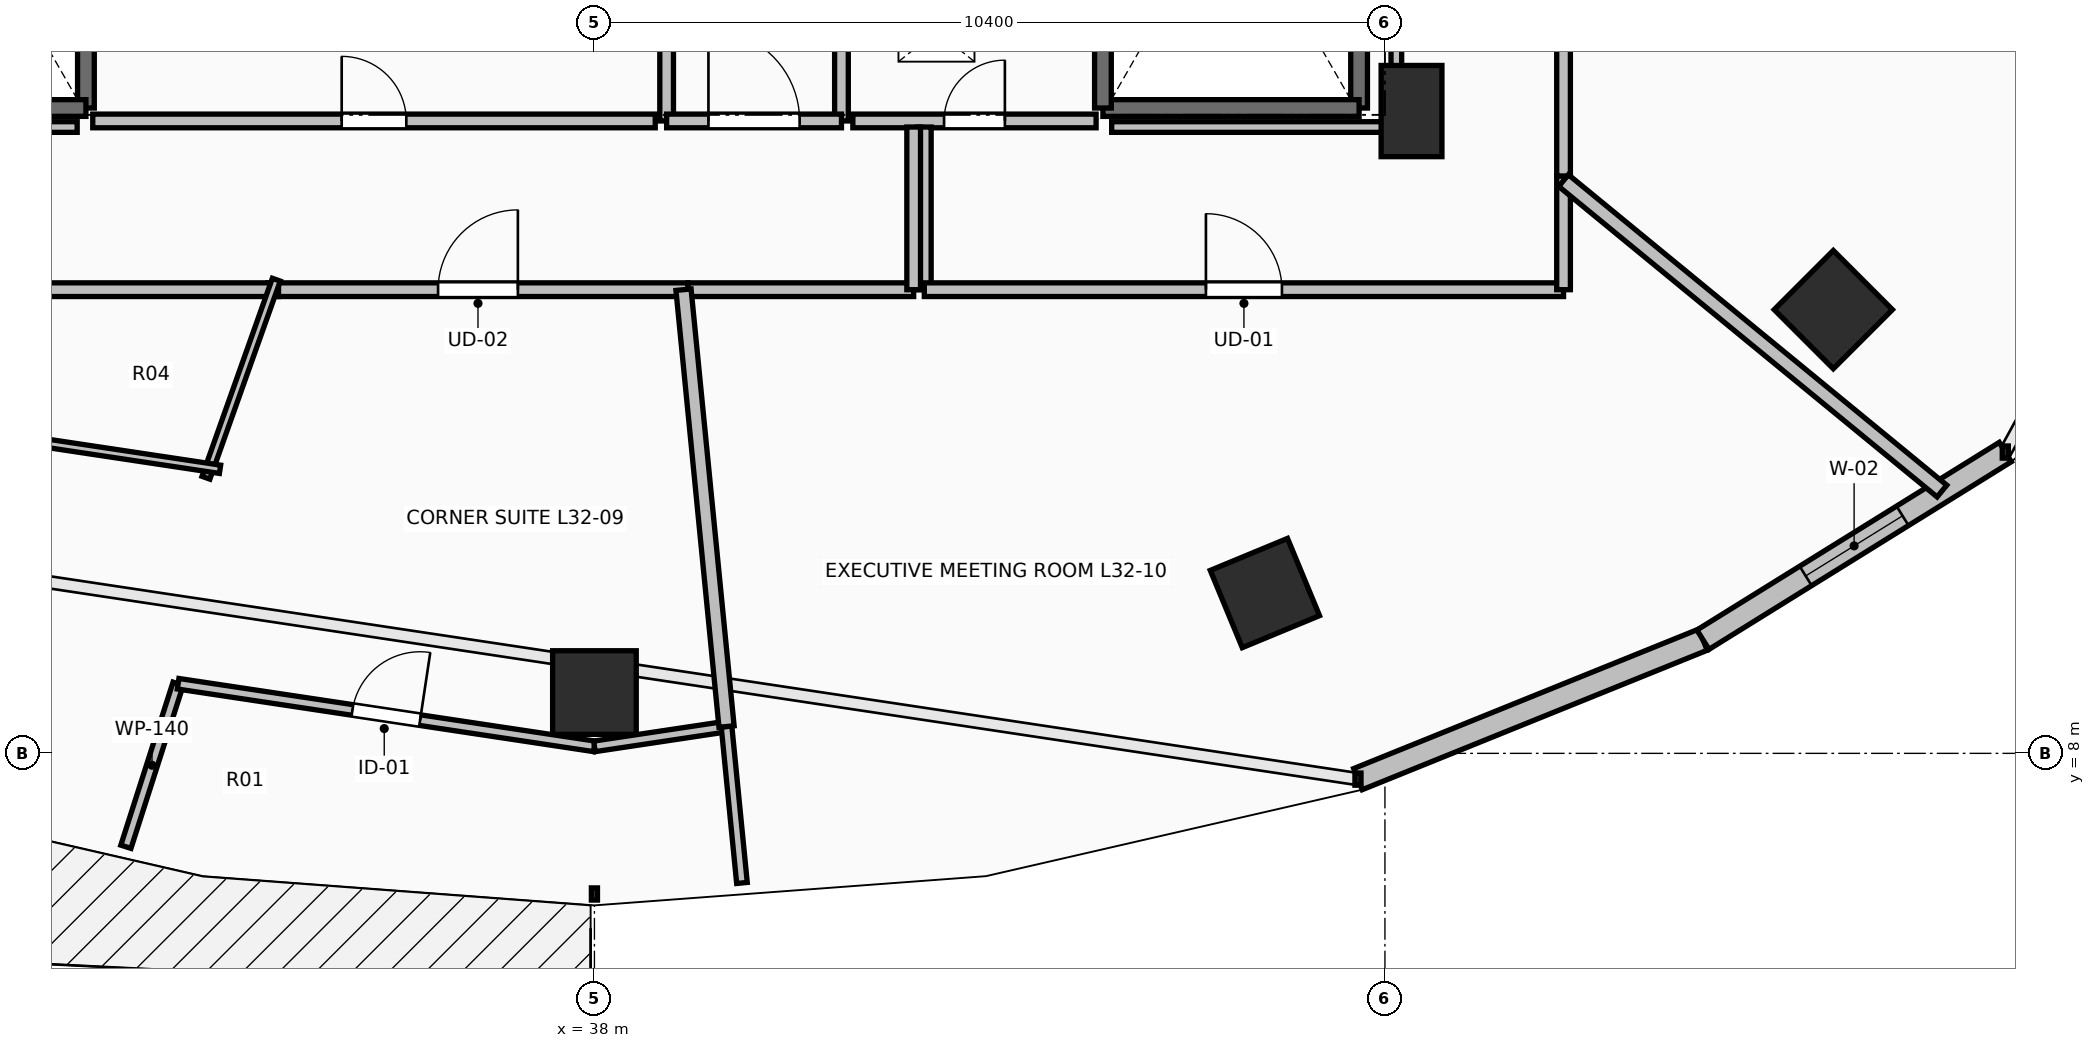
"""IFC4 building model, lengths in metres.
Left out: names, types, materials, properties, quantities, classifications, styles, units other than length and angle.
Written with IfcOpenShell. Run it as: python <this file> out.ifc"""

import sys

from ifc_helpers import new_model, si_unit, direction, frame, frame_2d, origin, origin_2d, place, context, subcontext, project, spatial, rectangle, extrude, element, fill, save


model = new_model("IFC4")
c1 = context("Model", 3, precision=1e-05, world=origin(), true_north=direction((0.0, 1.0)))
c2 = subcontext(c1, "Body", "Model", "MODEL_VIEW")
j1 = project(units=[si_unit("LENGTHUNIT", "METRE"), si_unit("PLANEANGLEUNIT", "RADIAN")], contexts=[c1])
p1 = place(None, origin())
s1 = spatial("IfcSite", under=j1, at=p1, CompositionType="ELEMENT")
p2 = place(p1, origin())
s2 = spatial("IfcBuilding", under=s1, at=p2, CompositionType="ELEMENT")
p3 = place(p2, frame((0.0, 0.0, 120.8)))
s3 = spatial("IfcBuildingStorey", under=s2, at=p3, CompositionType="ELEMENT", Elevation=120.8)
for number, where, z_axis, x_axis in (
    (1, (38.0, 8.8, 0.0), (0.0, 0.0, 1.0), (0.0, -1.0, 0.0)),
    (2, (46.821, 10.109, 0.0), (0.0, 0.0, 1.0), (0.383, -0.924, 0.0)),
    (3, (54.299, 13.838, 0.0), (0.0, 0.0, 1.0), (0.707, -0.707, 0.0)),
):
    element("IfcColumn", number, at=place(p3, frame(where, z_axis=z_axis, x_axis=x_axis)), inside=s3, PredefinedType="COLUMN", context=c2, shape_type="SweptSolid", body=[
        extrude(rectangle(XDim=1.1, YDim=1.1, at=origin_2d()), origin(), (0.0, 0.0, 1.0), 3.5),
    ])
p4 = place(p3, frame((48.75, 16.45, 0.0), z_axis=(0.0, 0.0, 1.0), x_axis=(1.0, 0.0, 0.0)))
e4 = element("IfcColumn", 4, at=p4, inside=s3, PredefinedType="PILASTER", context=c2, shape_type="SweptSolid", body=[
    extrude(rectangle(XDim=0.8, YDim=1.2, at=origin_2d()), origin(), (0.0, 0.0, 1.0), 3.5),
])
p5 = place(p3, frame((48.045, 7.661, 0.0), z_axis=(0.0, 0.0, 1.0), x_axis=(0.927122233109, 0.374759075775, 0.0)))
e5 = element("IfcWall", 5, at=p5, inside=s3, PredefinedType="STANDARD", context=c2, shape_type="SweptSolid", body=[
    extrude(rectangle(XDim=4.895, YDim=0.3, at=frame_2d((2.448, 0.0))), origin(), (0.0, 0.0, 1.0), 3.15),
])
p6 = place(p3, frame((52.584, 9.495, 0.0), z_axis=(0.0, 0.0, 1.0), x_axis=(0.849684479743, 0.527291461038, 0.0)))
e6 = element("IfcWall", 6, at=p6, inside=s3, PredefinedType="STANDARD", context=c2, shape_type="SweptSolid", body=[
    extrude(rectangle(XDim=4.681, YDim=0.3, at=frame_2d((2.341, 0.0))), origin(), (0.0, 0.0, 1.0), 3.15),
])
p7 = place(p6, frame((1.591, 0.0, 0.85)))
e7 = element("IfcOpeningElement", 7, at=p7, cuts=e6, PredefinedType="OPENING", context=c2, shape_type="SweptSolid", body=[
    extrude(rectangle(XDim=1.5, YDim=2.1, at=frame_2d((0.75, 1.05))), frame((0.0, 0.165, 0.0), z_axis=(0.0, -1.0, 0.0), x_axis=(1.0, 0.0, 0.0)), (0.0, 0.0, 1.0), 0.33),
])
p8 = place(p3, frame((31.31, 23.91, 0.0), z_axis=(0.0, 0.0, 1.0), x_axis=(0.0, -1.0, 0.0)))
e8 = element("IfcWall", 8, at=p8, inside=s3, PredefinedType="SOLIDWALL", context=c2, shape_type="SweptSolid", body=[
    extrude(rectangle(XDim=7.42, YDim=0.22, at=frame_2d((3.71, 0.0))), origin(), (0.0, 0.0, 1.0), 3.15),
])
p9 = place(p3, frame((31.31, 16.49, 0.0), z_axis=(0.0, 0.0, 1.0), x_axis=(-1.0, 0.0, 0.0)))
e9 = element("IfcWall", 9, at=p9, inside=s3, PredefinedType="SOLIDWALL", context=c2, shape_type="SweptSolid", body=[
    extrude(rectangle(XDim=3.37, YDim=0.22, at=frame_2d((1.685, 0.0))), origin(), (0.0, 0.0, 1.0), 3.15),
])
p10 = place(p3, frame((48.06, 23.91, 0.0), z_axis=(0.0, 0.0, 1.0), x_axis=(0.0, -1.0, 0.0)))
e10 = element("IfcWall", 10, at=p10, inside=s3, PredefinedType="SOLIDWALL", context=c2, shape_type="SweptSolid", body=[
    extrude(rectangle(XDim=7.42, YDim=0.22, at=frame_2d((3.71, 0.0))), origin(), (0.0, 0.0, 1.0), 3.15),
])
p11 = place(p3, frame((48.06, 16.49, 0.0), z_axis=(0.0, 0.0, 1.0), x_axis=(-1.0, 0.0, 0.0)))
e11 = element("IfcWall", 11, at=p11, inside=s3, PredefinedType="SOLIDWALL", context=c2, shape_type="SweptSolid", body=[
    extrude(rectangle(XDim=3.37, YDim=0.22, at=frame_2d((1.685, 0.0))), origin(), (0.0, 0.0, 1.0), 3.15),
])
p12 = place(p3, frame((44.69, 16.49, 0.0), z_axis=(0.0, 0.0, 1.0), x_axis=(0.0, 1.0, 0.0)))
e12 = element("IfcWall", 12, at=p12, inside=s3, PredefinedType="SOLIDWALL", context=c2, shape_type="SweptSolid", body=[
    extrude(rectangle(XDim=7.42, YDim=0.22, at=frame_2d((3.71, 0.0))), origin(), (0.0, 0.0, 1.0), 3.15),
])
p13 = place(p3, frame((41.25, 16.32, 0.0), z_axis=(0.0, 0.0, 1.0), x_axis=(0.0, 1.0, 0.0)))
e13 = element("IfcWall", 13, at=p13, inside=s3, PredefinedType="PARTITIONING", context=c2, shape_type="SweptSolid", body=[
    extrude(rectangle(XDim=3.985, YDim=0.18, at=frame_2d((1.992, 0.0))), origin(), (0.0, 0.0, 1.0), 3.15),
])
p14 = place(p13, frame((1.593, 0.0, 0.0)))
e14 = element("IfcOpeningElement", 14, at=p14, cuts=e13, PredefinedType="OPENING", context=c2, shape_type="SweptSolid", body=[
    extrude(rectangle(XDim=0.8, YDim=2.05, at=frame_2d((0.4, 1.025))), frame((0.0, 0.105, 0.0), z_axis=(0.0, -1.0, 0.0), x_axis=(1.0, 0.0, 0.0)), (0.0, 0.0, 1.0), 0.21),
])
p15 = place(p3, frame((38.95, 21.755, 0.0), z_axis=(0.0, 0.0, 1.0), x_axis=(0.0, -1.0, 0.0)))
e15 = element("IfcWall", 15, at=p15, inside=s3, PredefinedType="PARTITIONING", context=c2, shape_type="SweptSolid", body=[
    extrude(rectangle(XDim=5.435, YDim=0.18, at=frame_2d((2.717, 0.0))), origin(), (0.0, 0.0, 1.0), 3.15),
])
p16 = place(p15, frame((2.292, 0.0, 0.0)))
e16 = element("IfcOpeningElement", 16, at=p16, cuts=e15, PredefinedType="OPENING", context=c2, shape_type="SweptSolid", body=[
    extrude(rectangle(XDim=0.85, YDim=2.1, at=frame_2d((0.425, 1.05))), frame((0.0, 0.105, 0.0), z_axis=(0.0, -1.0, 0.0), x_axis=(1.0, 0.0, 0.0)), (0.0, 0.0, 1.0), 0.21),
])
p17 = place(p3, frame((38.95, 16.32, 0.0), z_axis=(0.0, 0.0, 1.0), x_axis=(1.0, 0.0, 0.0)))
e17 = element("IfcWall", 17, at=p17, inside=s3, PredefinedType="PARTITIONING", context=c2, shape_type="SweptSolid", body=[
    extrude(rectangle(XDim=2.3, YDim=0.18, at=frame_2d((1.15, 0.0))), origin(), (0.0, 0.0, 1.0), 3.15),
])
p18 = place(p17, frame((0.55, 0.0, 0.0)))
e18 = element("IfcOpeningElement", 18, at=p18, cuts=e17, PredefinedType="OPENING", context=c2, shape_type="SweptSolid", body=[
    extrude(rectangle(XDim=1.2, YDim=2.15, at=frame_2d((0.6, 1.075))), frame((0.0, 0.105, 0.0), z_axis=(0.0, -1.0, 0.0), x_axis=(1.0, 0.0, 0.0)), (0.0, 0.0, 1.0), 0.21),
])
p19 = place(p3, frame((41.4, 16.32, 0.0), z_axis=(0.0, 0.0, 1.0), x_axis=(1.0, 0.0, 0.0)))
e19 = element("IfcWall", 19, at=p19, inside=s3, PredefinedType="PARTITIONING", context=c2, shape_type="SweptSolid", body=[
    extrude(rectangle(XDim=3.2, YDim=0.18, at=frame_2d((1.6, 0.0))), origin(), (0.0, 0.0, 1.0), 3.15),
])
p20 = place(p19, frame((1.2, 0.0, 0.0)))
e20 = element("IfcOpeningElement", 20, at=p20, cuts=e19, PredefinedType="OPENING", context=c2, shape_type="SweptSolid", body=[
    extrude(rectangle(XDim=0.8, YDim=2.05, at=frame_2d((0.4, 1.025))), frame((0.0, 0.105, 0.0), z_axis=(0.0, -1.0, 0.0), x_axis=(1.0, 0.0, 0.0)), (0.0, 0.0, 1.0), 0.21),
])
p21 = place(p3, frame((31.4, 16.32, 0.0), z_axis=(0.0, 0.0, 1.0), x_axis=(1.0, 0.0, 0.0)))
e21 = element("IfcWall", 21, at=p21, inside=s3, PredefinedType="PARTITIONING", context=c2, shape_type="SweptSolid", body=[
    extrude(rectangle(XDim=7.4, YDim=0.18, at=frame_2d((3.7, 0.0))), origin(), (0.0, 0.0, 1.0), 3.15),
])
p22 = place(p21, frame((3.275, 0.0, 0.0)))
e22 = element("IfcOpeningElement", 22, at=p22, cuts=e21, PredefinedType="OPENING", context=c2, shape_type="SweptSolid", body=[
    extrude(rectangle(XDim=0.85, YDim=2.1, at=frame_2d((0.425, 1.05))), frame((0.0, 0.105, 0.0), z_axis=(0.0, -1.0, 0.0), x_axis=(1.0, 0.0, 0.0)), (0.0, 0.0, 1.0), 0.21),
])
p23 = place(p3, frame((33.704, 14.1, 0.0), z_axis=(0.0, 0.0, 1.0), x_axis=(1.0, 0.0, 0.0)))
e23 = element("IfcWall", 23, at=p23, inside=s3, PredefinedType="PARTITIONING", context=c2, shape_type="SweptSolid", body=[
    extrude(rectangle(XDim=5.528, YDim=0.18, at=frame_2d((2.764, 0.0))), origin(), (0.0, 0.0, 1.0), 2.784),
])
p24 = place(p23, frame((2.239, 0.0, 0.0)))
e24 = element("IfcOpeningElement", 24, at=p24, cuts=e23, PredefinedType="OPENING", context=c2, shape_type="SweptSolid", body=[
    extrude(rectangle(XDim=1.05, YDim=2.2, at=frame_2d((0.525, 1.1))), frame((0.0, 0.105, 0.0), z_axis=(0.0, -1.0, 0.0), x_axis=(1.0, 0.0, 0.0)), (0.0, 0.0, 1.0), 0.21),
])
p25 = place(p3, frame((28.154, 14.1, 0.0), z_axis=(0.0, 0.0, 1.0), x_axis=(1.0, 0.0, 0.0)))
e25 = element("IfcWall", 25, at=p25, inside=s3, PredefinedType="PARTITIONING", context=c2, shape_type="SweptSolid", body=[
    extrude(rectangle(XDim=5.69, YDim=0.18, at=frame_2d((2.845, 0.0))), origin(), (0.0, 0.0, 1.0), 2.342),
])
p26 = place(p3, frame((42.34, 16.24, 0.0), z_axis=(0.0, 0.0, 1.0), x_axis=(0.0, -1.0, 0.0)))
e26 = element("IfcWall", 26, at=p26, inside=s3, PredefinedType="PARTITIONING", context=c2, shape_type="SweptSolid", body=[
    extrude(rectangle(XDim=2.14, YDim=0.18, at=frame_2d((1.07, 0.0))), origin(), (0.0, 0.0, 1.0), 2.784),
])
p27 = place(p3, frame((42.34, 14.1, 0.0), z_axis=(0.0, 0.0, 1.0), x_axis=(1.0, 0.0, 0.0)))
e27 = element("IfcWall", 27, at=p27, inside=s3, PredefinedType="PARTITIONING", context=c2, shape_type="SweptSolid", body=[
    extrude(rectangle(XDim=8.41, YDim=0.18, at=frame_2d((4.205, 0.0))), origin(), (0.0, 0.0, 1.0), 2.342),
])
p28 = place(p27, frame((3.705, 0.0, 0.0)))
e28 = element("IfcOpeningElement", 28, at=p28, cuts=e27, PredefinedType="OPENING", context=c2, shape_type="SweptSolid", body=[
    extrude(rectangle(XDim=1.0, YDim=2.15, at=frame_2d((0.5, 1.075))), frame((0.0, 0.105, 0.0), z_axis=(0.0, -1.0, 0.0), x_axis=(1.0, 0.0, 0.0)), (0.0, 0.0, 1.0), 0.21),
])
p29 = place(p3, frame((50.75, 14.1, 0.0), z_axis=(0.0, 0.0, 1.0), x_axis=(0.0, 1.0, 0.0)))
e29 = element("IfcWall", 29, at=p29, inside=s3, PredefinedType="PARTITIONING", context=c2, shape_type="SweptSolid", body=[
    extrude(rectangle(XDim=1.496, YDim=0.18, at=frame_2d((0.748, 0.0))), origin(), (0.0, 0.0, 1.0), 2.342),
])
p30 = place(p3, frame((39.232, 14.1, 0.0), z_axis=(0.0, 0.0, 1.0), x_axis=(1.0, 0.0, 0.0)))
e30 = element("IfcWall", 30, at=p30, inside=s3, PredefinedType="PARTITIONING", context=c2, shape_type="SweptSolid", body=[
    extrude(rectangle(XDim=2.968, YDim=0.18, at=frame_2d((1.484, 0.0))), origin(), (0.0, 0.0, 1.0), 2.784),
])
p31 = place(p3, frame((42.2, 14.1, 0.0), z_axis=(0.0, 0.0, 1.0), x_axis=(0.0, 1.0, 0.0)))
e31 = element("IfcWall", 31, at=p31, inside=s3, PredefinedType="PARTITIONING", context=c2, shape_type="SweptSolid", body=[
    extrude(rectangle(XDim=2.14, YDim=0.18, at=frame_2d((1.07, 0.0))), origin(), (0.0, 0.0, 1.0), 2.784),
])
p32 = place(p3, frame((50.75, 15.596, 0.0), z_axis=(0.0, 0.0, 1.0), x_axis=(0.0, 1.0, 0.0)))
e32 = element("IfcWall", 32, at=p32, inside=s3, PredefinedType="PARTITIONING", context=c2, shape_type="SweptSolid", body=[
    extrude(rectangle(XDim=11.46, YDim=0.18, at=frame_2d((5.73, 0.0))), origin(), (0.0, 0.0, 1.0), 2.342),
])
p33 = place(p32, frame((5.23, 0.0, 0.0)))
e33 = element("IfcOpeningElement", 33, at=p33, cuts=e32, PredefinedType="OPENING", context=c2, shape_type="SweptSolid", body=[
    extrude(rectangle(XDim=1.0, YDim=2.15, at=frame_2d((0.5, 1.075))), frame((0.0, 0.105, 0.0), z_axis=(0.0, -1.0, 0.0), x_axis=(1.0, 0.0, 0.0)), (0.0, 0.0, 1.0), 0.21),
])
p34 = place(p3, frame((33.815, 14.232, 0.0), z_axis=(0.0, 0.0, 1.0), x_axis=(-0.334786713612, -0.942293933117, 0.0)))
e34 = element("IfcWall", 34, at=p34, inside=s3, PredefinedType="PARTITIONING", context=c2, shape_type="SweptSolid", body=[
    extrude(rectangle(XDim=2.765, YDim=0.11, at=frame_2d((1.383, 0.0))), origin(), (0.0, 0.0, 1.0), 2.784),
])
p35 = place(p3, frame((33.074, 11.737, 0.0), z_axis=(0.0, 0.0, 1.0), x_axis=(-0.988902866222, 0.148563525729, 0.0)))
e35 = element("IfcWall", 35, at=p35, inside=s3, PredefinedType="PARTITIONING", context=c2, shape_type="SweptSolid", body=[
    extrude(rectangle(XDim=2.836, YDim=0.11, at=frame_2d((1.418, 0.0))), origin(), (0.0, 0.0, 1.0), 3.15),
])
p36 = place(p3, frame((31.836, 6.771, 0.0), z_axis=(0.0, 0.0, 1.0), x_axis=(0.305019563363, 0.952346085184, 0.0)))
e36 = element("IfcWall", 36, at=p36, inside=s3, PredefinedType="PARTITIONING", context=c2, shape_type="SweptSolid", body=[
    extrude(rectangle(XDim=2.252, YDim=0.14, at=frame_2d((1.126, 0.0))), origin(), (0.0, 0.0, 1.0), 3.15),
])
p37 = place(p3, frame((32.523, 8.916, 0.0), z_axis=(0.0, 0.0, 1.0), x_axis=(0.988872243588, -0.148767220385, 0.0)))
e37 = element("IfcWall", 37, at=p37, inside=s3, PredefinedType="PARTITIONING", context=c2, shape_type="SweptSolid", body=[
    extrude(rectangle(XDim=5.539, YDim=0.14, at=frame_2d((2.769, 0.0))), origin(), (0.0, 0.0, 1.0), 3.15),
])
p38 = place(p37, frame((2.319, 0.0, 0.0)))
e38 = element("IfcOpeningElement", 38, at=p38, cuts=e37, PredefinedType="OPENING", context=c2, shape_type="SweptSolid", body=[
    extrude(rectangle(XDim=0.9, YDim=2.1, at=frame_2d((0.45, 1.05))), frame((0.0, 0.085, 0.0), z_axis=(0.0, -1.0, 0.0), x_axis=(1.0, 0.0, 0.0)), (0.0, 0.0, 1.0), 0.17),
])
p39 = place(p3, frame((38.0, 8.092, 0.0), z_axis=(0.0, 0.0, 1.0), x_axis=(0.988912905534, 0.148496684368, 0.0)))
e39 = element("IfcWall", 39, at=p39, inside=s3, PredefinedType="PARTITIONING", context=c2, shape_type="SweptSolid", body=[
    extrude(rectangle(XDim=1.758, YDim=0.14, at=frame_2d((0.879, 0.0))), origin(), (0.0, 0.0, 1.0), 3.15),
])
p40 = place(p3, frame((39.738, 8.353, 0.0), z_axis=(0.0, 0.0, 1.0), x_axis=(0.098101024823, -0.995176461201, 0.0)))
e40 = element("IfcWall", 40, at=p40, inside=s3, PredefinedType="PARTITIONING", context=c2, shape_type="SweptSolid", body=[
    extrude(rectangle(XDim=2.068, YDim=0.14, at=frame_2d((1.034, 0.0))), origin(), (0.0, 0.0, 1.0), 3.15),
])
p41 = place(p3, frame((39.738, 8.353, 0.0), z_axis=(0.0, 0.0, 1.0), x_axis=(-0.098038593066, 0.995182613529, 0.0)))
e41 = element("IfcWall", 41, at=p41, inside=s3, PredefinedType="PARTITIONING", context=c2, shape_type="SweptSolid", body=[
    extrude(rectangle(XDim=5.775, YDim=0.2, at=frame_2d((2.887, 0.0))), origin(), (0.0, 0.0, 1.0), 2.342),
])
p42 = place(p3, frame((55.728, 11.451, 0.0), z_axis=(0.0, 0.0, 1.0), x_axis=(-0.7730409537, 0.634356117573, 0.0)))
e42 = element("IfcWall", 42, at=p42, inside=s3, PredefinedType="PARTITIONING", context=c2, shape_type="SweptSolid", body=[
    extrude(rectangle(XDim=6.439, YDim=0.2, at=frame_2d((3.22, 0.0))), origin(), (0.0, 0.0, 1.0), 2.342),
])
p43 = place(p3, frame((48.55, 23.754, 0.0), z_axis=(0.0, 0.0, 1.0), x_axis=(0.0, -1.0, 0.0)))
e43 = element("IfcWall", 43, at=p43, inside=s3, PredefinedType="PARTITIONING", context=c2, shape_type="SweptSolid", body=[
    extrude(rectangle(XDim=7.514, YDim=0.14, at=frame_2d((3.757, 0.0))), origin(), (0.0, 0.0, 1.0), 2.342),
])
for number, where, z_axis, x_axis in (
    (44, (48.55, 16.24, 0.0), (0.0, 0.0, 1.0), (-1.0, 0.0, 0.0)),
    (45, (31.195, 16.24, 0.0), (0.0, 0.0, 1.0), (-1.0, 0.0, 0.0)),
):
    element("IfcWall", number, at=place(p3, frame(where, z_axis=z_axis, x_axis=x_axis)), inside=s3, PredefinedType="PARTITIONING", context=c2, shape_type="SweptSolid", body=[
        extrude(rectangle(XDim=3.745, YDim=0.14, at=frame_2d((1.873, 0.0))), origin(), (0.0, 0.0, 1.0), 2.342),
    ])
p44 = place(p7, origin())
e46 = element("IfcWindow", 46, at=p44, inside=s3, PartitioningType="SINGLE_PANEL", PredefinedType="WINDOW", context=c2, shape_type="SweptSolid", body=[
    extrude(rectangle(XDim=1.5, YDim=2.1, at=frame_2d((0.75, 1.05))), frame((0.0, 0.03, 0.0), z_axis=(0.0, -1.0, 0.0), x_axis=(1.0, 0.0, 0.0)), (0.0, 0.0, 1.0), 0.06),
])
fill(e7, e46)
p45 = place(p18, origin())
e47 = element("IfcDoor", 47, at=p45, inside=s3, OperationType="SINGLE_SWING_LEFT", PredefinedType="DOOR", context=c2, shape_type="SweptSolid", body=[
    extrude(rectangle(XDim=1.2, YDim=2.15, at=frame_2d((0.6, 1.075))), frame((0.0, 0.025, 0.0), z_axis=(0.0, -1.0, 0.0), x_axis=(1.0, 0.0, 0.0)), (0.0, 0.0, 1.0), 0.05),
])
fill(e18, e47)
p46 = place(p20, origin())
e48 = element("IfcDoor", 48, at=p46, inside=s3, OperationType="SINGLE_SWING_RIGHT", PredefinedType="DOOR", context=c2, shape_type="SweptSolid", body=[
    extrude(rectangle(XDim=0.8, YDim=2.05, at=frame_2d((0.4, 1.025))), frame((0.0, 0.025, 0.0), z_axis=(0.0, -1.0, 0.0), x_axis=(1.0, 0.0, 0.0)), (0.0, 0.0, 1.0), 0.05),
])
fill(e20, e48)
p47 = place(p22, origin())
e49 = element("IfcDoor", 49, at=p47, inside=s3, OperationType="SINGLE_SWING_LEFT", PredefinedType="DOOR", context=c2, shape_type="SweptSolid", body=[
    extrude(rectangle(XDim=0.85, YDim=2.1, at=frame_2d((0.425, 1.05))), frame((0.0, 0.025, 0.0), z_axis=(0.0, -1.0, 0.0), x_axis=(1.0, 0.0, 0.0)), (0.0, 0.0, 1.0), 0.05),
])
fill(e22, e49)
p48 = place(p24, origin())
e50 = element("IfcDoor", 50, at=p48, inside=s3, OperationType="SINGLE_SWING_RIGHT", PredefinedType="DOOR", context=c2, shape_type="SweptSolid", body=[
    extrude(rectangle(XDim=1.05, YDim=2.2, at=frame_2d((0.525, 1.1))), frame((0.0, 0.025, 0.0), z_axis=(0.0, -1.0, 0.0), x_axis=(1.0, 0.0, 0.0)), (0.0, 0.0, 1.0), 0.05),
])
fill(e24, e50)
p49 = place(p28, origin())
e51 = element("IfcDoor", 51, at=p49, inside=s3, OperationType="SINGLE_SWING_LEFT", PredefinedType="DOOR", context=c2, shape_type="SweptSolid", body=[
    extrude(rectangle(XDim=1.0, YDim=2.15, at=frame_2d((0.5, 1.075))), frame((0.0, 0.025, 0.0), z_axis=(0.0, -1.0, 0.0), x_axis=(1.0, 0.0, 0.0)), (0.0, 0.0, 1.0), 0.05),
])
fill(e28, e51)
p50 = place(p38, origin())
e52 = element("IfcDoor", 52, at=p50, inside=s3, OperationType="SINGLE_SWING_RIGHT", PredefinedType="DOOR", context=c2, shape_type="SweptSolid", body=[
    extrude(rectangle(XDim=0.9, YDim=2.1, at=frame_2d((0.45, 1.05))), frame((0.0, 0.025, 0.0), z_axis=(0.0, -1.0, 0.0), x_axis=(1.0, 0.0, 0.0)), (0.0, 0.0, 1.0), 0.05),
])
fill(e38, e52)
save(model, sys.argv[1])
